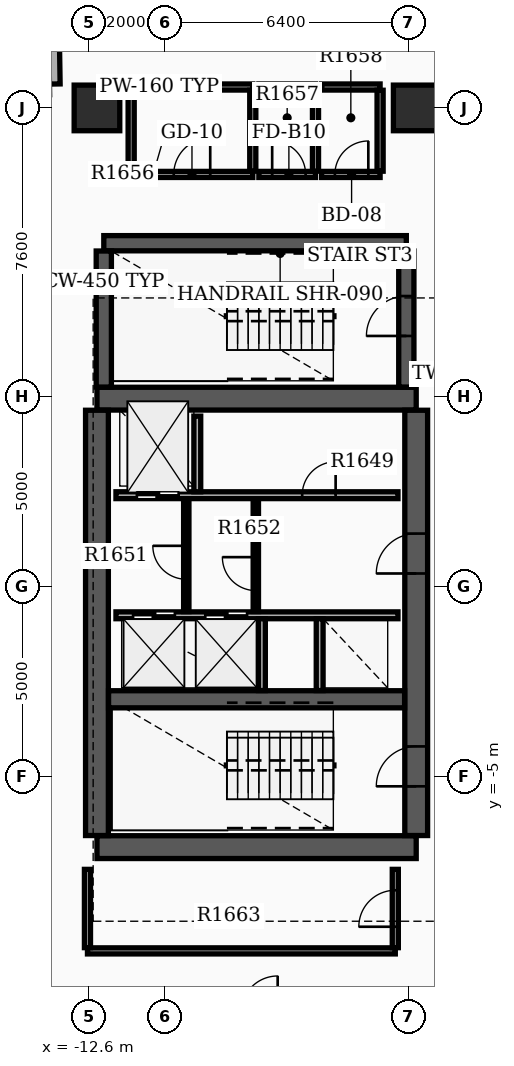
"""IFC4 building model, lengths in metres.
Left out: names, types, materials, properties, quantities, classifications, styles, units other than length and angle.
Written with IfcOpenShell. Run it as: python <this file> out.ifc"""

import sys

from ifc_helpers import new_model, si_unit, direction, frame, frame_2d, origin, origin_2d, place, context, subcontext, project, spatial, rectangle, extrude, element, fill, save


model = new_model("IFC4")
c1 = context("Model", 3, precision=1e-05, world=origin(), true_north=direction((0.0, 1.0)))
c2 = subcontext(c1, "Body", "Model", "MODEL_VIEW")
j1 = project(units=[si_unit("LENGTHUNIT", "METRE"), si_unit("PLANEANGLEUNIT", "RADIAN")], contexts=[c1])
p1 = place(None, origin())
s1 = spatial("IfcSite", under=j1, at=p1, CompositionType="ELEMENT")
p2 = place(p1, origin())
s2 = spatial("IfcBuilding", under=s1, at=p2, CompositionType="ELEMENT")
p3 = place(p2, frame((0.0, 0.0, 108.6)))
s3 = spatial("IfcBuildingStorey", under=s2, at=p3, CompositionType="ELEMENT", Elevation=108.6)
for number, where, z_axis, x_axis in (
    (1, (-12.4, -6.85, 0.0), (0.0, 0.0, 1.0), (1.0, 0.0, 0.0)),
    (2, (-12.4, 4.95, 0.0), (0.0, 0.0, 1.0), (1.0, 0.0, 0.0)),
):
    element("IfcWall", number, at=place(p3, frame(where, z_axis=z_axis, x_axis=x_axis)), inside=s3, PredefinedType="SHEAR", context=c2, shape_type="SweptSolid", body=[
        extrude(rectangle(XDim=8.4, YDim=0.6, at=frame_2d((4.2, 0.0))), origin(), (0.0, 0.0, 1.0), 3.7),
    ])
p4 = place(p3, frame((-12.4, -6.545, 0.0), z_axis=(0.0, 0.0, 1.0), x_axis=(0.0, 1.0, 0.0)))
e3 = element("IfcWall", 3, at=p4, inside=s3, PredefinedType="SHEAR", context=c2, shape_type="SweptSolid", body=[
    extrude(rectangle(XDim=11.19, YDim=0.6, at=frame_2d((5.595, 0.0))), origin(), (0.0, 0.0, 1.0), 3.7),
])
p5 = place(p3, frame((-4.0, -6.545, 0.0), z_axis=(0.0, 0.0, 1.0), x_axis=(0.0, 1.0, 0.0)))
e4 = element("IfcWall", 4, at=p5, inside=s3, PredefinedType="SHEAR", context=c2, shape_type="SweptSolid", body=[
    extrude(rectangle(XDim=11.19, YDim=0.6, at=frame_2d((5.595, 0.0))), origin(), (0.0, 0.0, 1.0), 3.7),
])
p6 = place(p5, frame((1.295, 0.0, 0.0)))
e5 = element("IfcOpeningElement", 5, at=p6, cuts=e4, PredefinedType="OPENING", context=c2, shape_type="SweptSolid", body=[
    extrude(rectangle(XDim=1.05, YDim=2.15, at=frame_2d((0.525, 1.075))), frame((0.0, 0.31, 0.0), z_axis=(0.0, -1.0, 0.0), x_axis=(1.0, 0.0, 0.0)), (0.0, 0.0, 1.0), 0.62),
])
p7 = place(p5, frame((6.895, 0.0, 0.0)))
e6 = element("IfcOpeningElement", 6, at=p7, cuts=e4, PredefinedType="OPENING", context=c2, shape_type="SweptSolid", body=[
    extrude(rectangle(XDim=1.05, YDim=2.15, at=frame_2d((0.525, 1.075))), frame((0.0, 0.31, 0.0), z_axis=(0.0, -1.0, 0.0), x_axis=(1.0, 0.0, 0.0)), (0.0, 0.0, 1.0), 0.62),
])
p8 = place(p3, frame((-12.095, -2.96, 0.0), z_axis=(0.0, 0.0, 1.0), x_axis=(1.0, 0.0, 0.0)))
e7 = element("IfcWall", 7, at=p8, inside=s3, PredefinedType="SHEAR", context=c2, shape_type="SweptSolid", body=[
    extrude(rectangle(XDim=7.79, YDim=0.45, at=frame_2d((3.895, 0.0))), origin(), (0.0, 0.0, 1.0), 3.7),
])
p9 = place(p3, frame((-12.22, 9.04, 0.0), z_axis=(0.0, 0.0, 1.0), x_axis=(1.0, 0.0, 0.0)))
e8 = element("IfcWall", 8, at=p9, inside=s3, PredefinedType="SHEAR", context=c2, shape_type="SweptSolid", body=[
    extrude(rectangle(XDim=7.96, YDim=0.4, at=frame_2d((3.98, 0.0))), origin(), (0.0, 0.0, 1.0), 3.7),
])
p10 = place(p3, frame((-12.22, 5.255, 0.0), z_axis=(0.0, 0.0, 1.0), x_axis=(0.0, 1.0, 0.0)))
e9 = element("IfcWall", 9, at=p10, inside=s3, PredefinedType="SHEAR", context=c2, shape_type="SweptSolid", body=[
    extrude(rectangle(XDim=3.58, YDim=0.4, at=frame_2d((1.79, 0.0))), origin(), (0.0, 0.0, 1.0), 3.7),
])
p11 = place(p3, frame((-4.26, 5.255, 0.0), z_axis=(0.0, 0.0, 1.0), x_axis=(0.0, 1.0, 0.0)))
e10 = element("IfcWall", 10, at=p11, inside=s3, PredefinedType="SHEAR", context=c2, shape_type="SweptSolid", body=[
    extrude(rectangle(XDim=3.58, YDim=0.4, at=frame_2d((1.79, 0.0))), origin(), (0.0, 0.0, 1.0), 3.7),
])
p12 = place(p11, frame((1.345, 0.0, 0.0)))
e11 = element("IfcOpeningElement", 11, at=p12, cuts=e10, PredefinedType="OPENING", context=c2, shape_type="SweptSolid", body=[
    extrude(rectangle(XDim=1.05, YDim=2.15, at=frame_2d((0.525, 1.075))), frame((0.0, 0.21, 0.0), z_axis=(0.0, -1.0, 0.0), x_axis=(1.0, 0.0, 0.0)), (0.0, 0.0, 1.0), 0.42),
])
for number, where, z_axis, x_axis in (
    (12, (-12.4, 12.6, 0.0), (0.0, 0.0, 1.0), (1.0, 0.0, 0.0)),
    (13, (-4.0, 12.6, 0.0), (0.0, 0.0, 1.0), (1.0, 0.0, 0.0)),
):
    element("IfcColumn", number, at=place(p3, frame(where, z_axis=z_axis, x_axis=x_axis)), inside=s3, PredefinedType="COLUMN", context=c2, shape_type="SweptSolid", body=[
        extrude(rectangle(XDim=1.2, YDim=1.2, at=origin_2d()), origin(), (0.0, 0.0, 1.0), 3.9),
    ])
p13 = place(p3, frame((-13.51, 13.229, 0.0), z_axis=(0.0, 0.0, 1.0), x_axis=(-0.015625635615, 0.999877912303, 0.0)))
e14 = element("IfcWall", 14, at=p13, inside=s3, PredefinedType="STANDARD", context=c2, shape_type="SweptSolid", body=[
    extrude(rectangle(XDim=1.5, YDim=0.28, at=frame_2d((0.75, 0.0))), origin(), (0.0, 0.0, 1.0), 2.97),
])
p14 = place(p3, frame((-11.9, 2.41, 0.0), z_axis=(0.0, 0.0, 1.0), x_axis=(1.0, 0.0, 0.0)))
e15 = element("IfcWall", 15, at=p14, inside=s3, PredefinedType="SOLIDWALL", context=c2, shape_type="SweptSolid", body=[
    extrude(rectangle(XDim=7.42, YDim=0.18, at=frame_2d((3.71, 0.0))), origin(), (0.0, 0.0, 1.0), 2.96),
])
p15 = place(p14, frame((0.55, 0.0, 0.0)))
e16 = element("IfcOpeningElement", 16, at=p15, cuts=e15, PredefinedType="OPENING", context=c2, shape_type="SweptSolid", body=[
    extrude(rectangle(XDim=1.1, YDim=2.15, at=frame_2d((0.55, 1.075))), frame((0.0, 0.1, 0.0), z_axis=(0.0, -1.0, 0.0), x_axis=(1.0, 0.0, 0.0)), (0.0, 0.0, 1.0), 0.2),
])
p16 = place(p14, frame((4.9, 0.0, 0.0)))
e17 = element("IfcOpeningElement", 17, at=p16, cuts=e15, PredefinedType="OPENING", context=c2, shape_type="SweptSolid", body=[
    extrude(rectangle(XDim=0.88, YDim=2.1, at=frame_2d((0.44, 1.05))), frame((0.0, 0.1, 0.0), z_axis=(0.0, -1.0, 0.0), x_axis=(1.0, 0.0, 0.0)), (0.0, 0.0, 1.0), 0.2),
])
p17 = place(p3, frame((-11.9, -0.75, 0.0), z_axis=(0.0, 0.0, 1.0), x_axis=(1.0, 0.0, 0.0)))
e18 = element("IfcWall", 18, at=p17, inside=s3, PredefinedType="SOLIDWALL", context=c2, shape_type="SweptSolid", body=[
    extrude(rectangle(XDim=7.42, YDim=0.18, at=frame_2d((3.71, 0.0))), origin(), (0.0, 0.0, 1.0), 2.96),
])
p18 = place(p17, frame((0.45, 0.0, 0.0)))
e19 = element("IfcOpeningElement", 19, at=p18, cuts=e18, PredefinedType="OPENING", context=c2, shape_type="SweptSolid", body=[
    extrude(rectangle(XDim=1.1, YDim=2.15, at=frame_2d((0.55, 1.075))), frame((0.0, 0.1, 0.0), z_axis=(0.0, -1.0, 0.0), x_axis=(1.0, 0.0, 0.0)), (0.0, 0.0, 1.0), 0.2),
])
p19 = place(p17, frame((2.35, 0.0, 0.0)))
e20 = element("IfcOpeningElement", 20, at=p19, cuts=e18, PredefinedType="OPENING", context=c2, shape_type="SweptSolid", body=[
    extrude(rectangle(XDim=1.1, YDim=2.15, at=frame_2d((0.55, 1.075))), frame((0.0, 0.1, 0.0), z_axis=(0.0, -1.0, 0.0), x_axis=(1.0, 0.0, 0.0)), (0.0, 0.0, 1.0), 0.2),
])
p20 = place(p3, frame((-9.76, 2.5, 0.0), z_axis=(0.0, 0.0, 1.0), x_axis=(0.0, 1.0, 0.0)))
e21 = element("IfcWall", 21, at=p20, inside=s3, PredefinedType="SOLIDWALL", context=c2, shape_type="SweptSolid", body=[
    extrude(rectangle(XDim=1.99, YDim=0.18, at=frame_2d((0.995, 0.0))), origin(), (0.0, 0.0, 1.0), 2.96),
])
for number, where, z_axis, x_axis in (
    (22, (-8.06, -2.73, 0.0), (0.0, 0.0, 1.0), (0.0, 1.0, 0.0)),
    (23, (-6.54, -2.73, 0.0), (0.0, 0.0, 1.0), (0.0, 1.0, 0.0)),
):
    element("IfcWall", number, at=place(p3, frame(where, z_axis=z_axis, x_axis=x_axis)), inside=s3, PredefinedType="SOLIDWALL", context=c2, shape_type="SweptSolid", body=[
        extrude(rectangle(XDim=1.89, YDim=0.18, at=frame_2d((0.945, 0.0))), origin(), (0.0, 0.0, 1.0), 2.96),
    ])
p21 = place(p3, frame((-8.22, -0.65, 0.0), z_axis=(0.0, 0.0, 1.0), x_axis=(0.0, 1.0, 0.0)))
e24 = element("IfcWall", 24, at=p21, inside=s3, PredefinedType="SOLIDWALL", context=c2, shape_type="SweptSolid", body=[
    extrude(rectangle(XDim=2.96, YDim=0.14, at=frame_2d((1.48, 0.0))), origin(), (0.0, 0.0, 1.0), 2.96),
])
p22 = place(p21, frame((0.55, 0.0, 0.0)))
e25 = element("IfcOpeningElement", 25, at=p22, cuts=e24, PredefinedType="OPENING", context=c2, shape_type="SweptSolid", body=[
    extrude(rectangle(XDim=0.88, YDim=2.1, at=frame_2d((0.44, 1.05))), frame((0.0, 0.08, 0.0), z_axis=(0.0, -1.0, 0.0), x_axis=(1.0, 0.0, 0.0)), (0.0, 0.0, 1.0), 0.16),
])
p23 = place(p3, frame((-10.05, -0.652, 0.0), z_axis=(0.0, 0.0, 1.0), x_axis=(0.0, 1.0, 0.0)))
e26 = element("IfcWall", 26, at=p23, inside=s3, PredefinedType="PARTITIONING", context=c2, shape_type="SweptSolid", body=[
    extrude(rectangle(XDim=2.962, YDim=0.14, at=frame_2d((1.481, 0.0))), origin(), (0.0, 0.0, 1.0), 2.96),
])
p24 = place(p23, frame((0.85, 0.0, 0.0)))
e27 = element("IfcOpeningElement", 27, at=p24, cuts=e26, PredefinedType="OPENING", context=c2, shape_type="SweptSolid", body=[
    extrude(rectangle(XDim=0.88, YDim=2.1, at=frame_2d((0.44, 1.05))), frame((0.0, 0.08, 0.0), z_axis=(0.0, -1.0, 0.0), x_axis=(1.0, 0.0, 0.0)), (0.0, 0.0, 1.0), 0.16),
])
p25 = place(p3, frame((-11.5, 10.85, 0.0), z_axis=(0.0, 0.0, 1.0), x_axis=(1.0, 0.0, 0.0)))
e28 = element("IfcWall", 28, at=p25, inside=s3, PredefinedType="PARTITIONING", context=c2, shape_type="SweptSolid", body=[
    extrude(rectangle(XDim=3.2, YDim=0.16, at=frame_2d((1.6, 0.0))), origin(), (0.0, 0.0, 1.0), 2.96),
])
p26 = place(p25, frame((1.12, 0.0, 0.0)))
e29 = element("IfcOpeningElement", 29, at=p26, cuts=e28, PredefinedType="OPENING", context=c2, shape_type="SweptSolid", body=[
    extrude(rectangle(XDim=0.96, YDim=2.15, at=frame_2d((0.48, 1.075))), frame((0.0, 0.09, 0.0), z_axis=(0.0, -1.0, 0.0), x_axis=(1.0, 0.0, 0.0)), (0.0, 0.0, 1.0), 0.18),
])
p27 = place(p3, frame((-11.5, 13.15, 0.0), z_axis=(0.0, 0.0, 1.0), x_axis=(1.0, 0.0, 0.0)))
e30 = element("IfcWall", 30, at=p27, inside=s3, PredefinedType="PARTITIONING", context=c2, shape_type="SweptSolid", body=[
    extrude(rectangle(XDim=3.2, YDim=0.16, at=frame_2d((1.6, 0.0))), origin(), (0.0, 0.0, 1.0), 2.96),
])
for number, where, z_axis, x_axis in (
    (31, (-11.5, 10.935, 0.0), (0.0, 0.0, 1.0), (0.0, 1.0, 0.0)),
    (32, (-8.3, 10.935, 0.0), (0.0, 0.0, 1.0), (0.0, 1.0, 0.0)),
):
    element("IfcWall", number, at=place(p3, frame(where, z_axis=z_axis, x_axis=x_axis)), inside=s3, PredefinedType="PARTITIONING", context=c2, shape_type="SweptSolid", body=[
        extrude(rectangle(XDim=2.13, YDim=0.16, at=frame_2d((1.065, 0.0))), origin(), (0.0, 0.0, 1.0), 2.96),
    ])
p28 = place(p3, frame((-8.14, 10.85, 0.0), z_axis=(0.0, 0.0, 1.0), x_axis=(1.0, 0.0, 0.0)))
e33 = element("IfcWall", 33, at=p28, inside=s3, PredefinedType="PARTITIONING", context=c2, shape_type="SweptSolid", body=[
    extrude(rectangle(XDim=1.49, YDim=0.16, at=frame_2d((0.745, 0.0))), origin(), (0.0, 0.0, 1.0), 2.96),
])
p29 = place(p28, frame((0.35, 0.0, 0.0)))
e34 = element("IfcOpeningElement", 34, at=p29, cuts=e33, PredefinedType="OPENING", context=c2, shape_type="SweptSolid", body=[
    extrude(rectangle(XDim=0.88, YDim=2.1, at=frame_2d((0.44, 1.05))), frame((0.0, 0.09, 0.0), z_axis=(0.0, -1.0, 0.0), x_axis=(1.0, 0.0, 0.0)), (0.0, 0.0, 1.0), 0.18),
])
p30 = place(p3, frame((-8.14, 13.15, 0.0), z_axis=(0.0, 0.0, 1.0), x_axis=(1.0, 0.0, 0.0)))
e35 = element("IfcWall", 35, at=p30, inside=s3, PredefinedType="PARTITIONING", context=c2, shape_type="SweptSolid", body=[
    extrude(rectangle(XDim=1.49, YDim=0.16, at=frame_2d((0.745, 0.0))), origin(), (0.0, 0.0, 1.0), 2.96),
])
p31 = place(p3, frame((-6.65, 10.935, 0.0), z_axis=(0.0, 0.0, 1.0), x_axis=(0.0, 1.0, 0.0)))
e36 = element("IfcWall", 36, at=p31, inside=s3, PredefinedType="PARTITIONING", context=c2, shape_type="SweptSolid", body=[
    extrude(rectangle(XDim=2.13, YDim=0.16, at=frame_2d((1.065, 0.0))), origin(), (0.0, 0.0, 1.0), 2.96),
])
p32 = place(p3, frame((-6.49, 10.85, 0.0), z_axis=(0.0, 0.0, 1.0), x_axis=(1.0, 0.0, 0.0)))
e37 = element("IfcWall", 37, at=p32, inside=s3, PredefinedType="PARTITIONING", context=c2, shape_type="SweptSolid", body=[
    extrude(rectangle(XDim=1.54, YDim=0.16, at=frame_2d((0.77, 0.0))), origin(), (0.0, 0.0, 1.0), 2.96),
])
p33 = place(p32, frame((0.35, 0.0, 0.0)))
e38 = element("IfcOpeningElement", 38, at=p33, cuts=e37, PredefinedType="OPENING", context=c2, shape_type="SweptSolid", body=[
    extrude(rectangle(XDim=0.88, YDim=2.15, at=frame_2d((0.44, 1.075))), frame((0.0, 0.09, 0.0), z_axis=(0.0, -1.0, 0.0), x_axis=(1.0, 0.0, 0.0)), (0.0, 0.0, 1.0), 0.18),
])
p34 = place(p3, frame((-6.49, 13.15, 0.0), z_axis=(0.0, 0.0, 1.0), x_axis=(1.0, 0.0, 0.0)))
e39 = element("IfcWall", 39, at=p34, inside=s3, PredefinedType="PARTITIONING", context=c2, shape_type="SweptSolid", body=[
    extrude(rectangle(XDim=1.54, YDim=0.16, at=frame_2d((0.77, 0.0))), origin(), (0.0, 0.0, 1.0), 2.96),
])
p35 = place(p3, frame((-4.95, 10.935, 0.0), z_axis=(0.0, 0.0, 1.0), x_axis=(0.0, 1.0, 0.0)))
e40 = element("IfcWall", 40, at=p35, inside=s3, PredefinedType="PARTITIONING", context=c2, shape_type="SweptSolid", body=[
    extrude(rectangle(XDim=2.13, YDim=0.16, at=frame_2d((1.065, 0.0))), origin(), (0.0, 0.0, 1.0), 2.96),
])
p36 = place(p3, frame((-12.65, -9.58, 0.0), z_axis=(0.0, 0.0, 1.0), x_axis=(1.0, 0.0, 0.0)))
e41 = element("IfcWall", 41, at=p36, inside=s3, PredefinedType="PARTITIONING", context=c2, shape_type="SweptSolid", body=[
    extrude(rectangle(XDim=8.1, YDim=0.16, at=frame_2d((4.05, 0.0))), origin(), (0.0, 0.0, 1.0), 2.96),
])
p37 = place(p3, frame((-12.65, -9.495, 0.0), z_axis=(0.0, 0.0, 1.0), x_axis=(0.0, 1.0, 0.0)))
e42 = element("IfcWall", 42, at=p37, inside=s3, PredefinedType="PARTITIONING", context=c2, shape_type="SweptSolid", body=[
    extrude(rectangle(XDim=2.06, YDim=0.16, at=frame_2d((1.03, 0.0))), origin(), (0.0, 0.0, 1.0), 2.96),
])
p38 = place(p3, frame((-4.55, -9.495, 0.0), z_axis=(0.0, 0.0, 1.0), x_axis=(0.0, 1.0, 0.0)))
e43 = element("IfcWall", 43, at=p38, inside=s3, PredefinedType="PARTITIONING", context=c2, shape_type="SweptSolid", body=[
    extrude(rectangle(XDim=2.06, YDim=0.16, at=frame_2d((1.03, 0.0))), origin(), (0.0, 0.0, 1.0), 2.96),
])
p39 = place(p38, frame((0.55, 0.0, 0.0)))
e44 = element("IfcOpeningElement", 44, at=p39, cuts=e43, PredefinedType="OPENING", context=c2, shape_type="SweptSolid", body=[
    extrude(rectangle(XDim=0.96, YDim=2.15, at=frame_2d((0.48, 1.075))), frame((0.0, 0.09, 0.0), z_axis=(0.0, -1.0, 0.0), x_axis=(1.0, 0.0, 0.0)), (0.0, 0.0, 1.0), 0.18),
])
p40 = place(p6, origin())
e45 = element("IfcDoor", 45, at=p40, inside=s3, OperationType="SINGLE_SWING_LEFT", PredefinedType="DOOR", context=c2, shape_type="SweptSolid", body=[
    extrude(rectangle(XDim=1.05, YDim=2.15, at=frame_2d((0.525, 1.075))), frame((0.0, 0.025, 0.0), z_axis=(0.0, -1.0, 0.0), x_axis=(1.0, 0.0, 0.0)), (0.0, 0.0, 1.0), 0.05),
])
fill(e5, e45)
p41 = place(p7, origin())
e46 = element("IfcDoor", 46, at=p41, inside=s3, OperationType="SINGLE_SWING_LEFT", PredefinedType="DOOR", context=c2, shape_type="SweptSolid", body=[
    extrude(rectangle(XDim=1.05, YDim=2.15, at=frame_2d((0.525, 1.075))), frame((0.0, 0.025, 0.0), z_axis=(0.0, -1.0, 0.0), x_axis=(1.0, 0.0, 0.0)), (0.0, 0.0, 1.0), 0.05),
])
fill(e6, e46)
p42 = place(p12, origin())
e47 = element("IfcDoor", 47, at=p42, inside=s3, OperationType="SINGLE_SWING_LEFT", PredefinedType="DOOR", context=c2, shape_type="SweptSolid", body=[
    extrude(rectangle(XDim=1.05, YDim=2.15, at=frame_2d((0.525, 1.075))), frame((0.0, 0.025, 0.0), z_axis=(0.0, -1.0, 0.0), x_axis=(1.0, 0.0, 0.0)), (0.0, 0.0, 1.0), 0.05),
])
fill(e11, e47)
p43 = place(p15, origin())
e48 = element("IfcDoor", 48, at=p43, inside=s3, OperationType="DOUBLE_DOOR_SLIDING", PredefinedType="DOOR", context=c2, shape_type="SweptSolid", body=[
    extrude(rectangle(XDim=1.1, YDim=2.15, at=frame_2d((0.55, 1.075))), frame((0.0, 0.025, 0.0), z_axis=(0.0, -1.0, 0.0), x_axis=(1.0, 0.0, 0.0)), (0.0, 0.0, 1.0), 0.05),
])
fill(e16, e48)
p44 = place(p18, origin())
e49 = element("IfcDoor", 49, at=p44, inside=s3, OperationType="DOUBLE_DOOR_SLIDING", PredefinedType="DOOR", context=c2, shape_type="SweptSolid", body=[
    extrude(rectangle(XDim=1.1, YDim=2.15, at=frame_2d((0.55, 1.075))), frame((0.0, 0.025, 0.0), z_axis=(0.0, -1.0, 0.0), x_axis=(1.0, 0.0, 0.0)), (0.0, 0.0, 1.0), 0.05),
])
fill(e19, e49)
p45 = place(p19, origin())
e50 = element("IfcDoor", 50, at=p45, inside=s3, OperationType="DOUBLE_DOOR_SLIDING", PredefinedType="DOOR", context=c2, shape_type="SweptSolid", body=[
    extrude(rectangle(XDim=1.1, YDim=2.15, at=frame_2d((0.55, 1.075))), frame((0.0, 0.025, 0.0), z_axis=(0.0, -1.0, 0.0), x_axis=(1.0, 0.0, 0.0)), (0.0, 0.0, 1.0), 0.05),
])
fill(e20, e50)
p46 = place(p16, origin())
e51 = element("IfcDoor", 51, at=p46, inside=s3, OperationType="SINGLE_SWING_RIGHT", PredefinedType="DOOR", context=c2, shape_type="SweptSolid", body=[
    extrude(rectangle(XDim=0.88, YDim=2.1, at=frame_2d((0.44, 1.05))), frame((0.0, 0.025, 0.0), z_axis=(0.0, -1.0, 0.0), x_axis=(1.0, 0.0, 0.0)), (0.0, 0.0, 1.0), 0.05),
])
fill(e17, e51)
p47 = place(p22, origin())
e52 = element("IfcDoor", 52, at=p47, inside=s3, OperationType="SINGLE_SWING_RIGHT", PredefinedType="DOOR", context=c2, shape_type="SweptSolid", body=[
    extrude(rectangle(XDim=0.88, YDim=2.1, at=frame_2d((0.44, 1.05))), frame((0.0, 0.025, 0.0), z_axis=(0.0, -1.0, 0.0), x_axis=(1.0, 0.0, 0.0)), (0.0, 0.0, 1.0), 0.05),
])
fill(e25, e52)
p48 = place(p24, origin())
e53 = element("IfcDoor", 53, at=p48, inside=s3, OperationType="SINGLE_SWING_RIGHT", PredefinedType="DOOR", context=c2, shape_type="SweptSolid", body=[
    extrude(rectangle(XDim=0.88, YDim=2.1, at=frame_2d((0.44, 1.05))), frame((0.0, 0.025, 0.0), z_axis=(0.0, -1.0, 0.0), x_axis=(1.0, 0.0, 0.0)), (0.0, 0.0, 1.0), 0.05),
])
fill(e27, e53)
p49 = place(p26, origin())
e54 = element("IfcDoor", 54, at=p49, inside=s3, OperationType="SINGLE_SWING_RIGHT", PredefinedType="DOOR", context=c2, shape_type="SweptSolid", body=[
    extrude(rectangle(XDim=0.96, YDim=2.15, at=frame_2d((0.48, 1.075))), frame((0.0, 0.025, 0.0), z_axis=(0.0, -1.0, 0.0), x_axis=(1.0, 0.0, 0.0)), (0.0, 0.0, 1.0), 0.05),
])
fill(e29, e54)
p50 = place(p29, origin())
e55 = element("IfcDoor", 55, at=p50, inside=s3, OperationType="SINGLE_SWING_LEFT", PredefinedType="DOOR", context=c2, shape_type="SweptSolid", body=[
    extrude(rectangle(XDim=0.88, YDim=2.1, at=frame_2d((0.44, 1.05))), frame((0.0, 0.025, 0.0), z_axis=(0.0, -1.0, 0.0), x_axis=(1.0, 0.0, 0.0)), (0.0, 0.0, 1.0), 0.05),
])
fill(e34, e55)
p51 = place(p33, origin())
e56 = element("IfcDoor", 56, at=p51, inside=s3, OperationType="SINGLE_SWING_RIGHT", PredefinedType="DOOR", context=c2, shape_type="SweptSolid", body=[
    extrude(rectangle(XDim=0.88, YDim=2.15, at=frame_2d((0.44, 1.075))), frame((0.0, 0.025, 0.0), z_axis=(0.0, -1.0, 0.0), x_axis=(1.0, 0.0, 0.0)), (0.0, 0.0, 1.0), 0.05),
])
fill(e38, e56)
p52 = place(p39, origin())
e57 = element("IfcDoor", 57, at=p52, inside=s3, OperationType="SINGLE_SWING_LEFT", PredefinedType="DOOR", context=c2, shape_type="SweptSolid", body=[
    extrude(rectangle(XDim=0.96, YDim=2.15, at=frame_2d((0.48, 1.075))), frame((0.0, 0.025, 0.0), z_axis=(0.0, -1.0, 0.0), x_axis=(1.0, 0.0, 0.0)), (0.0, 0.0, 1.0), 0.05),
])
fill(e44, e57)
save(model, sys.argv[1])
